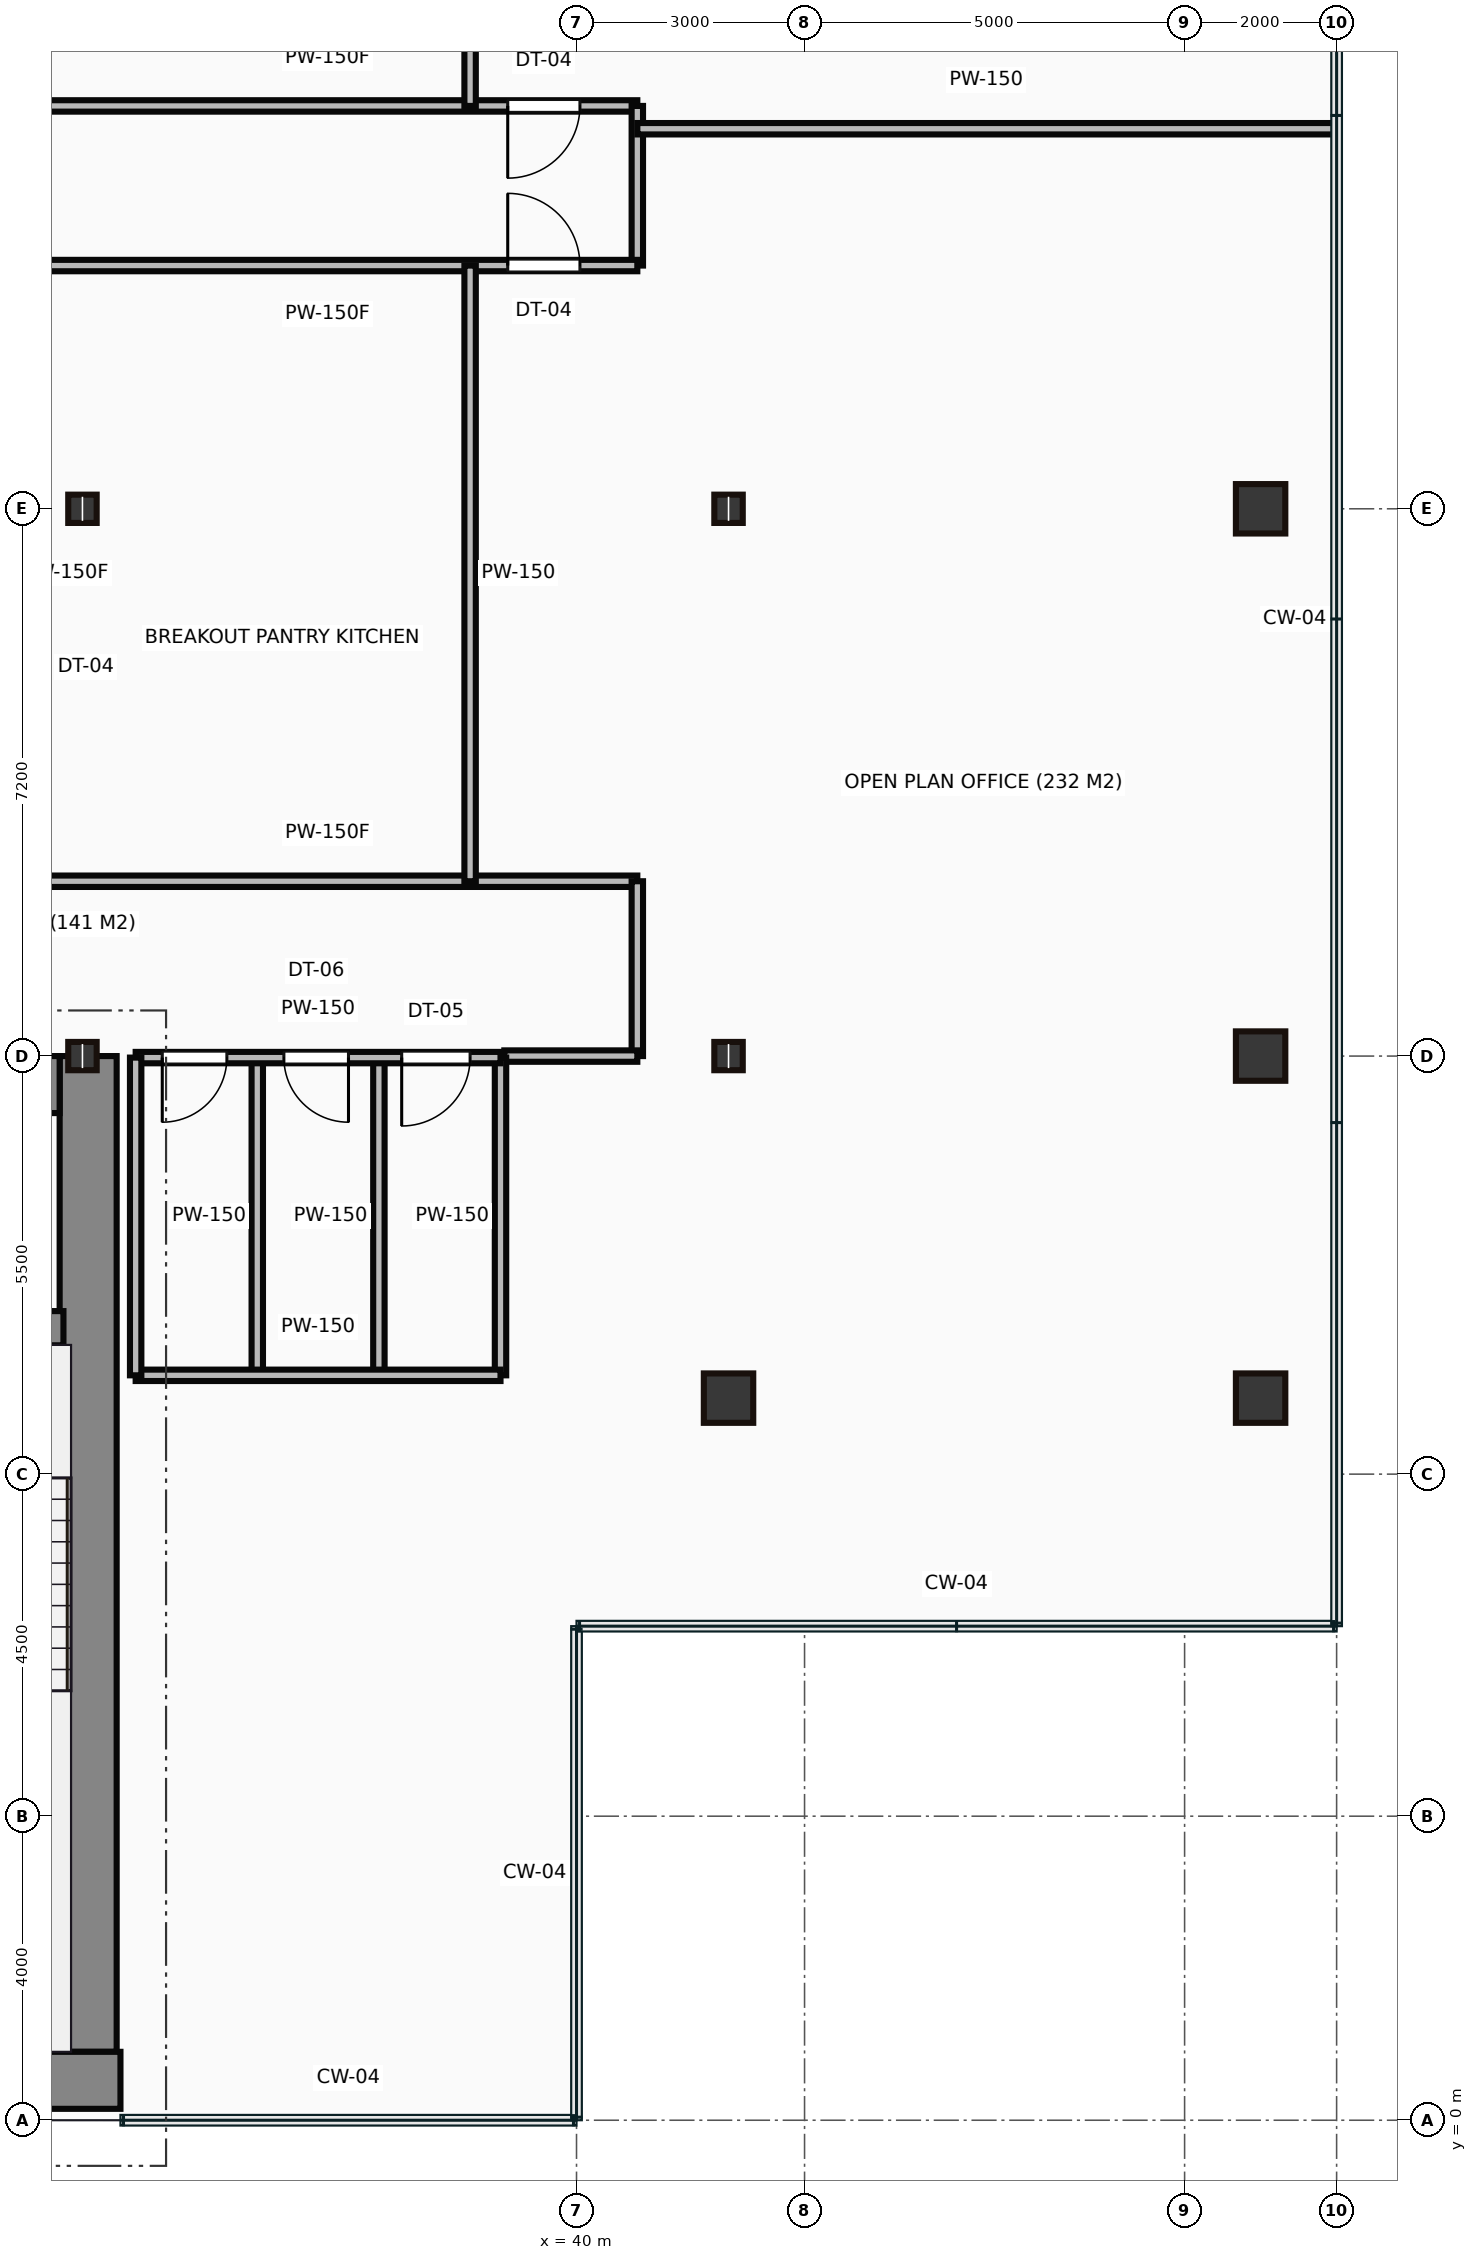
"""IFC4 building model, lengths in metres.
Left out: names, types, materials, properties, quantities, classifications, styles, units other than length and angle.
Written with IfcOpenShell. Run it as: python <this file> out.ifc"""

import sys

from ifc_helpers import new_model, si_unit, direction, frame, frame_2d, origin, origin_2d, place, context, subcontext, project, spatial, rectangle, hollow_rectangle, i_section, extrude, source, transform, mapped, element, fill, save


model = new_model("IFC4")
c1 = context("Model", 3, precision=1e-05, world=origin(), true_north=direction((0.0, 1.0)))
c2 = subcontext(c1, "Body", "Model", "MODEL_VIEW")
j1 = project(units=[si_unit("LENGTHUNIT", "METRE"), si_unit("PLANEANGLEUNIT", "RADIAN")], contexts=[c1])
p1 = place(None, origin())
s1 = spatial("IfcSite", under=j1, at=p1, CompositionType="ELEMENT")
p2 = place(p1, origin())
s2 = spatial("IfcBuilding", under=s1, at=p2, CompositionType="ELEMENT")
p3 = place(p2, frame((0.0, 0.0, 151.55)))
s3 = spatial("IfcBuildingStorey", under=s2, at=p3, CompositionType="ELEMENT", Elevation=151.55)
m1 = source(origin(), c2, "Body", "SweptSolid", [
    extrude(rectangle(XDim=29.5, YDim=0.75, at=frame_2d((14.75, 0.0))), origin(), (0.0, 0.0, 1.0), 3.65),
])
p4 = place(p3, frame((4.5, 0.525, 0.0), z_axis=(0.0, 0.0, 1.0), x_axis=(1.0, 0.0, 0.0)))
e1 = element("IfcWall", 1, at=p4, inside=s3, PredefinedType="SHEAR", context=c2, shape_type="MappedRepresentation", body=[
    mapped(m1, transform((0.0, 0.0, 0.0))),
])
m2 = source(origin(), c2, "Body", "SweptSolid", [
    extrude(rectangle(XDim=13.1, YDim=0.75, at=frame_2d((6.55, 0.0))), origin(), (0.0, 0.0, 1.0), 3.65),
])
p5 = place(p3, frame((33.575, 0.9, 0.0), z_axis=(0.0, 0.0, 1.0), x_axis=(0.0, 1.0, 0.0)))
e2 = element("IfcWall", 2, at=p5, inside=s3, PredefinedType="SHEAR", context=c2, shape_type="MappedRepresentation", body=[
    mapped(m2, transform((0.0, 0.0, 0.0))),
])
m3 = source(origin(), c2, "Body", "SweptSolid", [
    extrude(rectangle(XDim=12.6, YDim=0.75, at=frame_2d((6.3, 0.0))), origin(), (0.0, 0.0, 1.0), 3.65),
])
p6 = place(p3, frame((20.6, 13.625, 0.0), z_axis=(0.0, 0.0, 1.0), x_axis=(1.0, 0.0, 0.0)))
e3 = element("IfcWall", 3, at=p6, inside=s3, PredefinedType="SHEAR", context=c2, shape_type="MappedRepresentation", body=[
    mapped(m3, transform((0.0, 0.0, 0.0))),
])
p7 = place(p6, frame((9.25, 0.0, 0.0)))
e4 = element("IfcOpeningElement", 4, at=p7, cuts=e3, PredefinedType="OPENING", context=c2, shape_type="SweptSolid", body=[
    extrude(rectangle(XDim=1.1, YDim=2.15, at=frame_2d((0.55, 1.075))), frame((0.0, 0.385, 0.0), z_axis=(0.0, -1.0, 0.0), x_axis=(1.0, 0.0, 0.0)), (0.0, 0.0, 1.0), 0.77),
])
m4 = source(origin(), c2, "Body", "SweptSolid", [
    extrude(rectangle(XDim=3.39, YDim=0.45, at=frame_2d((1.695, 0.0))), origin(), (0.0, 0.0, 1.0), 3.65),
])
p8 = place(p3, frame((29.86, 10.42, 0.0), z_axis=(0.0, 0.0, 1.0), x_axis=(1.0, 0.0, 0.0)))
e5 = element("IfcWall", 5, at=p8, inside=s3, PredefinedType="SHEAR", context=c2, shape_type="MappedRepresentation", body=[
    mapped(m4, transform((0.0, 0.0, 0.0))),
])
p9 = place(p8, frame((1.1, 0.0, 0.0)))
e6 = element("IfcOpeningElement", 6, at=p9, cuts=e5, PredefinedType="OPENING", context=c2, shape_type="SweptSolid", body=[
    extrude(rectangle(XDim=1.1, YDim=2.15, at=frame_2d((0.55, 1.075))), frame((0.0, 0.235, 0.0), z_axis=(0.0, -1.0, 0.0), x_axis=(1.0, 0.0, 0.0)), (0.0, 0.0, 1.0), 0.47),
])
m5 = source(origin(), c2, "Body", "SweptSolid", [
    extrude(i_section(OverallWidth=0.374, OverallDepth=0.372, WebThickness=0.016, FlangeThickness=0.026, at=origin_2d()), origin(), (0.0, 0.0, 1.0), 3.65),
])
for number, where, z_axis, x_axis in (
    (7, (33.5, 14.0, 0.0), (0.0, 0.0, 1.0), (1.0, 0.0, 0.0)),
    (8, (33.5, 21.2, 0.0), (0.0, 0.0, 1.0), (1.0, 0.0, 0.0)),
):
    element("IfcColumn", number, at=place(p3, frame(where, z_axis=z_axis, x_axis=x_axis)), inside=s3, PredefinedType="COLUMN", context=c2, shape_type="MappedRepresentation", body=[
        mapped(m5, transform((0.0, 0.0, 0.0))),
    ])
m6 = source(origin(), c2, "Body", "SweptSolid", [
    extrude(hollow_rectangle(XDim=0.65, YDim=0.65, WallThickness=0.032, at=origin_2d()), origin(), (0.0, 0.0, 1.0), 3.65),
])
p10 = place(p3, frame((42.0, 9.5, 0.0), z_axis=(0.0, 0.0, 1.0), x_axis=(1.0, 0.0, 0.0)))
e9 = element("IfcColumn", 9, at=p10, inside=s3, PredefinedType="COLUMN", context=c2, shape_type="MappedRepresentation", body=[
    mapped(m6, transform((0.0, 0.0, 0.0))),
])
for number, where, z_axis, x_axis in (
    (10, (42.0, 14.0, 0.0), (0.0, 0.0, 1.0), (1.0, 0.0, 0.0)),
    (11, (42.0, 21.2, 0.0), (0.0, 0.0, 1.0), (1.0, 0.0, 0.0)),
):
    element("IfcColumn", number, at=place(p3, frame(where, z_axis=z_axis, x_axis=x_axis)), inside=s3, PredefinedType="COLUMN", context=c2, shape_type="MappedRepresentation", body=[
        mapped(m5, transform((0.0, 0.0, 0.0))),
    ])
for number, where, z_axis, x_axis in (
    (12, (49.0, 9.5, 0.0), (0.0, 0.0, 1.0), (1.0, 0.0, 0.0)),
    (13, (49.0, 14.0, 0.0), (0.0, 0.0, 1.0), (1.0, 0.0, 0.0)),
    (14, (49.0, 21.2, 0.0), (0.0, 0.0, 1.0), (1.0, 0.0, 0.0)),
):
    element("IfcColumn", number, at=place(p3, frame(where, z_axis=z_axis, x_axis=x_axis)), inside=s3, PredefinedType="COLUMN", context=c2, shape_type="MappedRepresentation", body=[
        mapped(m6, transform((0.0, 0.0, 0.0))),
    ])
m7 = source(origin(), c2, "Body", "SweptSolid", [
    extrude(rectangle(XDim=4.8, YDim=0.15, at=frame_2d((2.4, 0.0))), origin(), (0.0, 0.0, 1.0), 2.76),
])
p11 = place(p3, frame((34.2, 13.98, 0.0), z_axis=(0.0, 0.0, 1.0), x_axis=(1.0, 0.0, 0.0)))
e15 = element("IfcWall", 15, at=p11, inside=s3, PredefinedType="PARTITIONING", context=c2, shape_type="MappedRepresentation", body=[
    mapped(m7, transform((0.0, 0.0, 0.0))),
])
p12 = place(p11, frame((0.35, 0.0, 0.0)))
e16 = element("IfcOpeningElement", 16, at=p12, cuts=e15, PredefinedType="OPENING", context=c2, shape_type="SweptSolid", body=[
    extrude(rectangle(XDim=0.85, YDim=2.1, at=frame_2d((0.425, 1.05))), frame((0.0, 0.085, 0.0), z_axis=(0.0, -1.0, 0.0), x_axis=(1.0, 0.0, 0.0)), (0.0, 0.0, 1.0), 0.17),
])
p13 = place(p11, frame((1.95, 0.0, 0.0)))
e17 = element("IfcOpeningElement", 17, at=p13, cuts=e15, PredefinedType="OPENING", context=c2, shape_type="SweptSolid", body=[
    extrude(rectangle(XDim=0.85, YDim=2.1, at=frame_2d((0.425, 1.05))), frame((0.0, 0.085, 0.0), z_axis=(0.0, -1.0, 0.0), x_axis=(1.0, 0.0, 0.0)), (0.0, 0.0, 1.0), 0.17),
])
p14 = place(p11, frame((3.5, 0.0, 0.0)))
e18 = element("IfcOpeningElement", 18, at=p14, cuts=e15, PredefinedType="OPENING", context=c2, shape_type="SweptSolid", body=[
    extrude(rectangle(XDim=0.9, YDim=2.1, at=frame_2d((0.45, 1.05))), frame((0.0, 0.085, 0.0), z_axis=(0.0, -1.0, 0.0), x_axis=(1.0, 0.0, 0.0)), (0.0, 0.0, 1.0), 0.17),
])
m8 = source(origin(), c2, "Body", "SweptSolid", [
    extrude(rectangle(XDim=4.8, YDim=0.15, at=frame_2d((2.4, 0.0))), origin(), (0.0, 0.0, 1.0), 3.4),
])
p15 = place(p3, frame((34.2, 9.8, 0.0), z_axis=(0.0, 0.0, 1.0), x_axis=(1.0, 0.0, 0.0)))
e19 = element("IfcWall", 19, at=p15, inside=s3, PredefinedType="PARTITIONING", context=c2, shape_type="MappedRepresentation", body=[
    mapped(m8, transform((0.0, 0.0, 0.0))),
])
m9 = source(origin(), c2, "Body", "SweptSolid", [
    extrude(rectangle(XDim=4.18, YDim=0.15, at=frame_2d((2.09, 0.0))), origin(), (0.0, 0.0, 1.0), 3.4),
])
for number, where, z_axis, x_axis in (
    (20, (39.0, 9.8, 0.0), (0.0, 0.0, 1.0), (0.0, 1.0, 0.0)),
    (21, (34.2, 9.8, 0.0), (0.0, 0.0, 1.0), (0.0, 1.0, 0.0)),
    (22, (35.8, 9.8, 0.0), (0.0, 0.0, 1.0), (0.0, 1.0, 0.0)),
    (23, (37.4, 9.8, 0.0), (0.0, 0.0, 1.0), (0.0, 1.0, 0.0)),
):
    element("IfcWall", number, at=place(p3, frame(where, z_axis=z_axis, x_axis=x_axis)), inside=s3, PredefinedType="PARTITIONING", context=c2, shape_type="MappedRepresentation", body=[
        mapped(m9, transform((0.0, 0.0, 0.0))),
    ])
m10 = source(origin(), c2, "Body", "SweptSolid", [
    extrude(rectangle(XDim=8.15, YDim=0.15, at=frame_2d((4.075, 0.0))), origin(), (0.0, 0.0, 1.0), 3.4),
])
p16 = place(p3, frame((32.65, 26.5, 0.0), z_axis=(0.0, 0.0, 1.0), x_axis=(1.0, 0.0, 0.0)))
e24 = element("IfcWall", 24, at=p16, inside=s3, PredefinedType="PARTITIONING", context=c2, shape_type="MappedRepresentation", body=[
    mapped(m10, transform((0.0, 0.0, 0.0))),
])
p17 = place(p16, frame((6.445, 0.0, 0.0)))
e25 = element("IfcOpeningElement", 25, at=p17, cuts=e24, PredefinedType="OPENING", context=c2, shape_type="SweptSolid", body=[
    extrude(rectangle(XDim=0.95, YDim=2.15, at=frame_2d((0.475, 1.075))), frame((0.0, 0.085, 0.0), z_axis=(0.0, -1.0, 0.0), x_axis=(1.0, 0.0, 0.0)), (0.0, 0.0, 1.0), 0.17),
])
m11 = source(origin(), c2, "Body", "SweptSolid", [
    extrude(rectangle(XDim=2.1, YDim=0.15, at=frame_2d((1.05, 0.0))), origin(), (0.0, 0.0, 1.0), 3.4),
])
p18 = place(p3, frame((40.8, 26.5, 0.0), z_axis=(0.0, 0.0, 1.0), x_axis=(0.0, -1.0, 0.0)))
e26 = element("IfcWall", 26, at=p18, inside=s3, PredefinedType="PARTITIONING", context=c2, shape_type="MappedRepresentation", body=[
    mapped(m11, transform((0.0, 0.0, 0.0))),
])
p19 = place(p3, frame((40.8, 24.4, 0.0), z_axis=(0.0, 0.0, 1.0), x_axis=(-1.0, 0.0, 0.0)))
e27 = element("IfcWall", 27, at=p19, inside=s3, PredefinedType="PARTITIONING", context=c2, shape_type="MappedRepresentation", body=[
    mapped(m10, transform((0.0, 0.0, 0.0))),
])
p20 = place(p19, frame((0.755, 0.0, 0.0)))
e28 = element("IfcOpeningElement", 28, at=p20, cuts=e27, PredefinedType="OPENING", context=c2, shape_type="SweptSolid", body=[
    extrude(rectangle(XDim=0.95, YDim=2.15, at=frame_2d((0.475, 1.075))), frame((0.0, 0.085, 0.0), z_axis=(0.0, -1.0, 0.0), x_axis=(1.0, 0.0, 0.0)), (0.0, 0.0, 1.0), 0.17),
])
p21 = place(p3, frame((32.65, 16.3, 0.0), z_axis=(0.0, 0.0, 1.0), x_axis=(1.0, 0.0, 0.0)))
e29 = element("IfcWall", 29, at=p21, inside=s3, PredefinedType="PARTITIONING", context=c2, shape_type="MappedRepresentation", body=[
    mapped(m10, transform((0.0, 0.0, 0.0))),
])
m12 = source(origin(), c2, "Body", "SweptSolid", [
    extrude(rectangle(XDim=2.3, YDim=0.15, at=frame_2d((1.15, 0.0))), origin(), (0.0, 0.0, 1.0), 3.4),
])
p22 = place(p3, frame((40.8, 16.3, 0.0), z_axis=(0.0, 0.0, 1.0), x_axis=(0.0, -1.0, 0.0)))
e30 = element("IfcWall", 30, at=p22, inside=s3, PredefinedType="PARTITIONING", context=c2, shape_type="MappedRepresentation", body=[
    mapped(m12, transform((0.0, 0.0, 0.0))),
])
m13 = source(origin(), c2, "Body", "SweptSolid", [
    extrude(rectangle(XDim=1.75, YDim=0.15, at=frame_2d((0.875, 0.0))), origin(), (0.0, 0.0, 1.0), 2.76),
])
p23 = place(p3, frame((40.8, 14.0, 0.0), z_axis=(0.0, 0.0, 1.0), x_axis=(-1.0, 0.0, 0.0)))
e31 = element("IfcWall", 31, at=p23, inside=s3, PredefinedType="PARTITIONING", context=c2, shape_type="MappedRepresentation", body=[
    mapped(m13, transform((0.0, 0.0, 0.0))),
])
m14 = source(origin(), c2, "Body", "SweptSolid", [
    extrude(rectangle(XDim=8.1, YDim=0.15, at=frame_2d((4.05, 0.0))), origin(), (0.0, 0.0, 1.0), 3.4),
])
p24 = place(p3, frame((38.6, 24.4, 0.0), z_axis=(0.0, 0.0, 1.0), x_axis=(0.0, -1.0, 0.0)))
e32 = element("IfcWall", 32, at=p24, inside=s3, PredefinedType="PARTITIONING", context=c2, shape_type="MappedRepresentation", body=[
    mapped(m14, transform((0.0, 0.0, 0.0))),
])
m15 = source(origin(), c2, "Body", "SweptSolid", [
    extrude(rectangle(XDim=7.3, YDim=0.15, at=frame_2d((3.65, 0.0))), origin(), (0.0, 0.0, 1.0), 3.4),
])
p25 = place(p3, frame((38.6, 33.8, 0.0), z_axis=(0.0, 0.0, 1.0), x_axis=(0.0, -1.0, 0.0)))
e33 = element("IfcWall", 33, at=p25, inside=s3, PredefinedType="PARTITIONING", context=c2, shape_type="MappedRepresentation", body=[
    mapped(m15, transform((0.0, 0.0, 0.0))),
])
m16 = source(origin(), c2, "Body", "SweptSolid", [
    extrude(rectangle(XDim=9.18, YDim=0.15, at=frame_2d((4.59, 0.0))), origin(), (0.0, 0.0, 1.0), 3.4),
])
p26 = place(p3, frame((40.8, 26.2, 0.0), z_axis=(0.0, 0.0, 1.0), x_axis=(1.0, 0.0, 0.0)))
e34 = element("IfcWall", 34, at=p26, inside=s3, PredefinedType="PARTITIONING", context=c2, shape_type="MappedRepresentation", body=[
    mapped(m16, transform((0.0, 0.0, 0.0))),
])
m17 = source(origin(), c2, "Body", "SweptSolid", [
    extrude(rectangle(XDim=0.85, YDim=2.1, at=frame_2d((0.425, 1.05))), frame((0.0, 0.025, 0.0), z_axis=(0.0, -1.0, 0.0), x_axis=(1.0, 0.0, 0.0)), (0.0, 0.0, 1.0), 0.05),
])
p27 = place(p12, frame((0.85, 0.0, 0.0), z_axis=(0.0, 0.0, 1.0), x_axis=(-1.0, 0.0, 0.0)))
e35 = element("IfcDoor", 35, at=p27, inside=s3, OperationType="SINGLE_SWING_LEFT", PredefinedType="DOOR", context=c2, shape_type="MappedRepresentation", body=[
    mapped(m17, transform((0.0, 0.0, 0.0))),
])
fill(e16, e35)
p28 = place(p13, frame((0.85, 0.0, 0.0), z_axis=(0.0, 0.0, 1.0), x_axis=(-1.0, 0.0, 0.0)))
e36 = element("IfcDoor", 36, at=p28, inside=s3, OperationType="SINGLE_SWING_RIGHT", PredefinedType="DOOR", context=c2, shape_type="MappedRepresentation", body=[
    mapped(m17, transform((0.0, 0.0, 0.0))),
])
fill(e17, e36)
m18 = source(origin(), c2, "Body", "SweptSolid", [
    extrude(rectangle(XDim=0.9, YDim=2.1, at=frame_2d((0.45, 1.05))), frame((0.0, 0.025, 0.0), z_axis=(0.0, -1.0, 0.0), x_axis=(1.0, 0.0, 0.0)), (0.0, 0.0, 1.0), 0.05),
])
p29 = place(p14, frame((0.9, 0.0, 0.0), z_axis=(0.0, 0.0, 1.0), x_axis=(-1.0, 0.0, 0.0)))
e37 = element("IfcDoor", 37, at=p29, inside=s3, OperationType="SINGLE_SWING_LEFT", PredefinedType="DOOR", context=c2, shape_type="MappedRepresentation", body=[
    mapped(m18, transform((0.0, 0.0, 0.0))),
])
fill(e18, e37)
m19 = source(origin(), c2, "Body", "SweptSolid", [
    extrude(rectangle(XDim=0.95, YDim=2.15, at=frame_2d((0.475, 1.075))), frame((0.0, 0.025, 0.0), z_axis=(0.0, -1.0, 0.0), x_axis=(1.0, 0.0, 0.0)), (0.0, 0.0, 1.0), 0.05),
])
p30 = place(p20, origin())
e38 = element("IfcDoor", 38, at=p30, inside=s3, OperationType="SINGLE_SWING_RIGHT", PredefinedType="DOOR", context=c2, shape_type="MappedRepresentation", body=[
    mapped(m19, transform((0.0, 0.0, 0.0))),
])
fill(e28, e38)
p31 = place(p17, origin())
e39 = element("IfcDoor", 39, at=p31, inside=s3, OperationType="SINGLE_SWING_LEFT", PredefinedType="DOOR", context=c2, shape_type="MappedRepresentation", body=[
    mapped(m19, transform((0.0, 0.0, 0.0))),
])
fill(e25, e39)
save(model, sys.argv[1])
